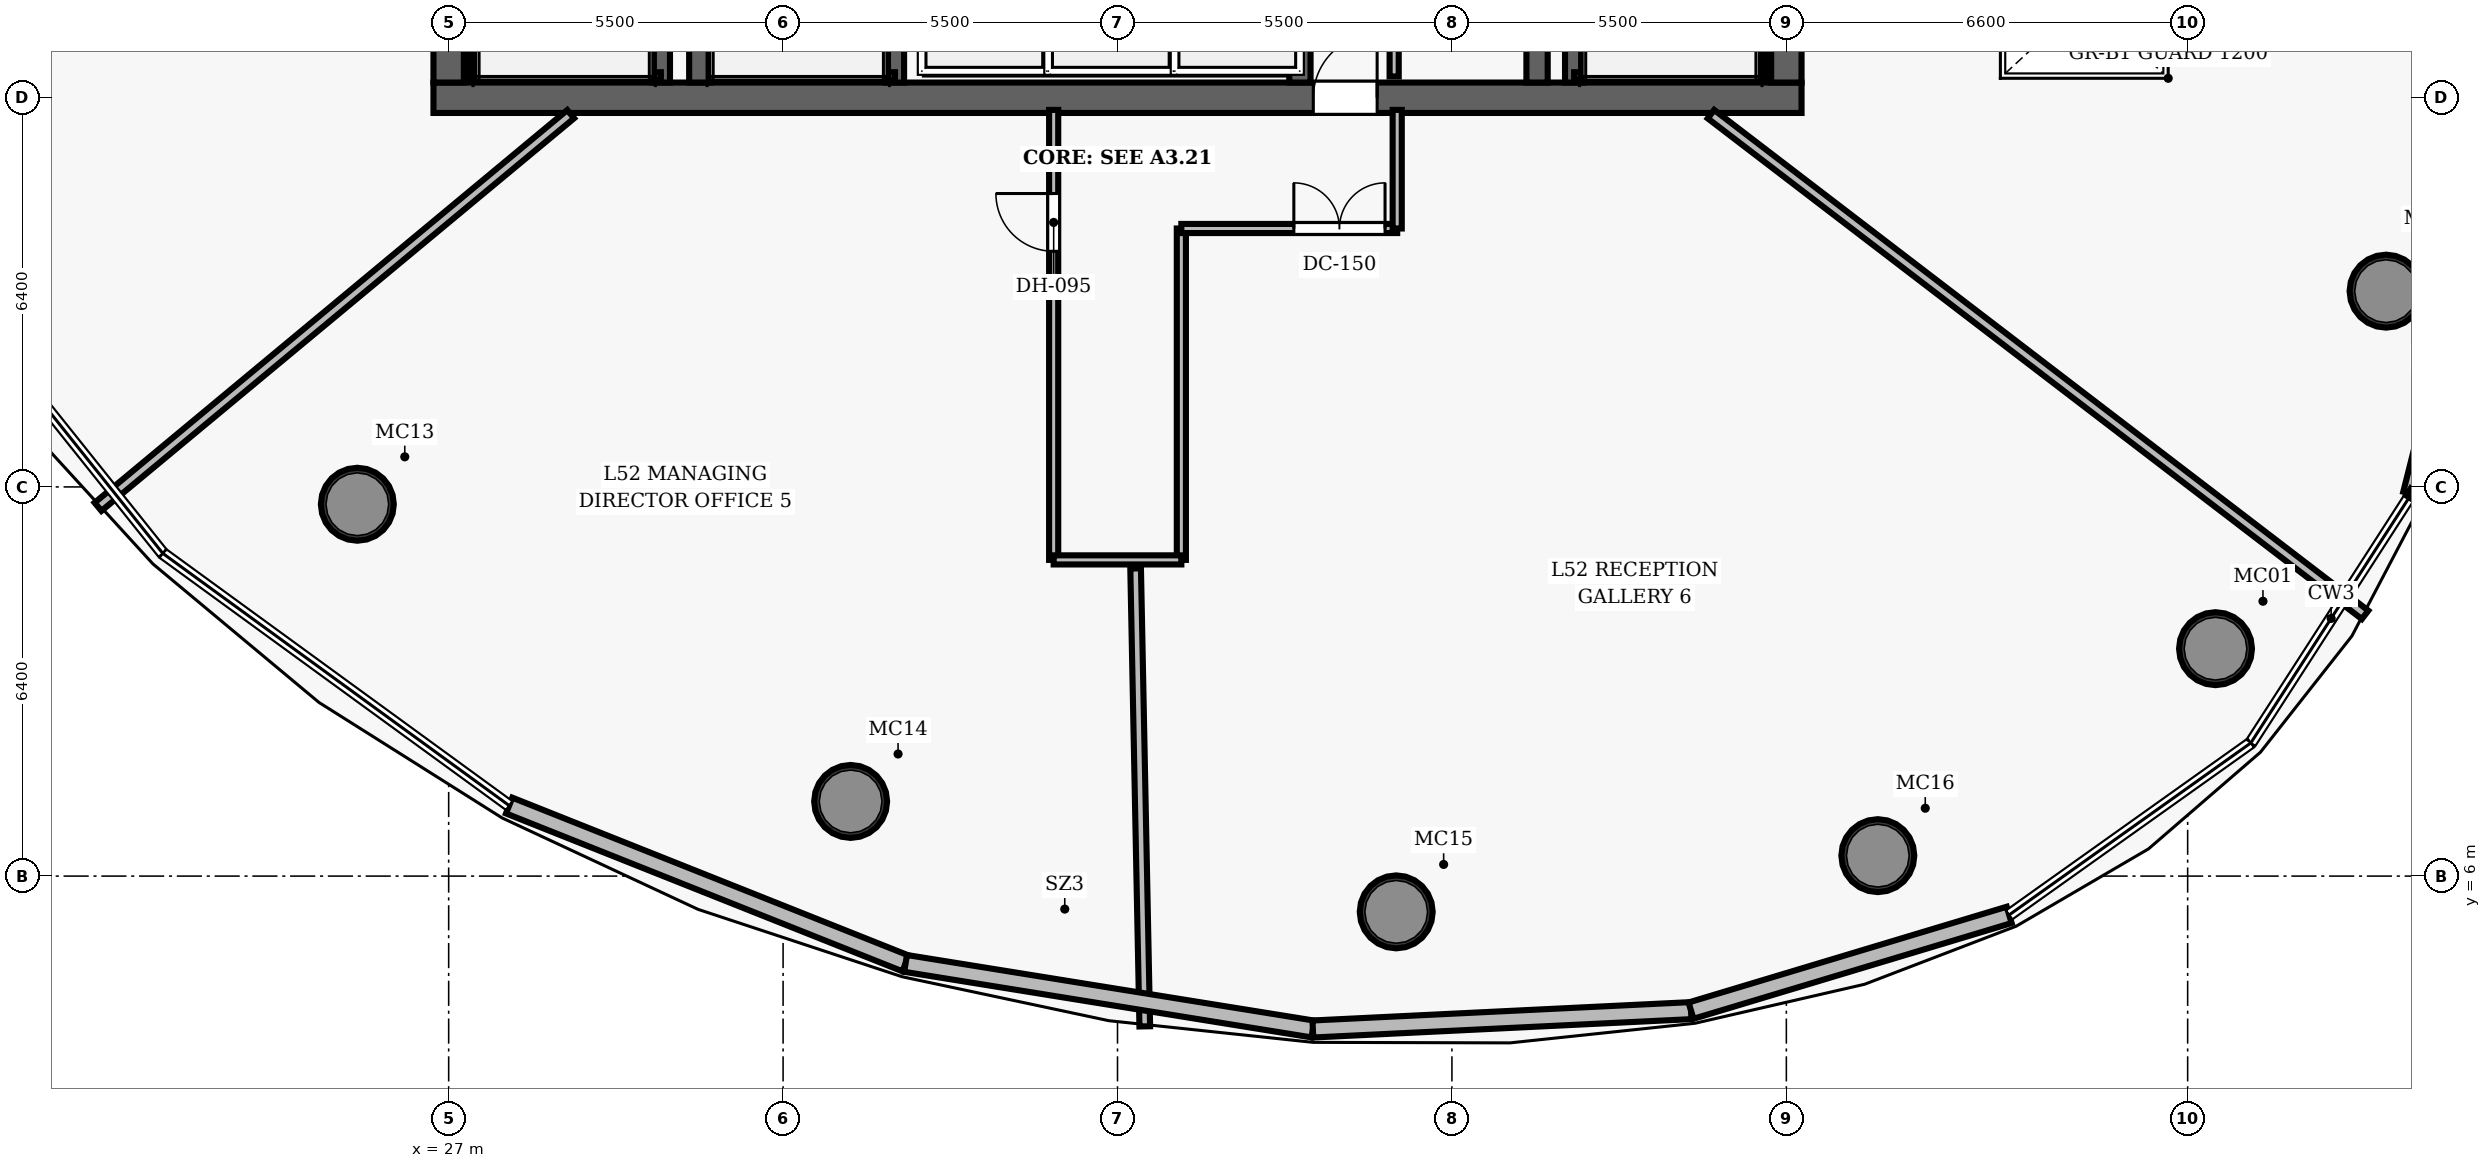
"""IFC4 building model, lengths in metres.
Left out: names, types, materials, properties, quantities, classifications, styles, units other than length and angle.
Written with IfcOpenShell. Run it as: python <this file> out.ifc"""

import sys

from ifc_helpers import new_model, si_unit, direction, frame, frame_2d, origin, origin_2d, place, context, subcontext, project, spatial, rectangle, hollow_circle, extrude, element, fill, save


model = new_model("IFC4")
c1 = context("Model", 3, precision=1e-05, world=origin(), true_north=direction((0.0, 1.0)))
c2 = subcontext(c1, "Body", "Model", "MODEL_VIEW")
j1 = project(units=[si_unit("LENGTHUNIT", "METRE"), si_unit("PLANEANGLEUNIT", "RADIAN")], contexts=[c1])
p1 = place(None, origin())
s1 = spatial("IfcSite", under=j1, at=p1, CompositionType="ELEMENT")
p2 = place(p1, origin())
s2 = spatial("IfcBuilding", under=s1, at=p2, CompositionType="ELEMENT")
p3 = place(p2, frame((0.0, 0.0, 205.85)))
s3 = spatial("IfcBuildingStorey", under=s2, at=p3, CompositionType="ELEMENT", Elevation=205.85)
p4 = place(p3, frame((26.75, 18.8, 0.0), z_axis=(0.0, 0.0, 1.0), x_axis=(1.0, 0.0, 0.0)))
e1 = element("IfcWall", 1, at=p4, inside=s3, PredefinedType="SHEAR", context=c2, shape_type="SweptSolid", body=[
    extrude(rectangle(XDim=22.5, YDim=0.5, at=frame_2d((11.25, 0.0))), origin(), (0.0, 0.0, 1.0), 3.85),
])
p5 = place(p4, frame((14.47, 0.0, 0.0)))
e2 = element("IfcOpeningElement", 2, at=p5, cuts=e1, PredefinedType="OPENING", context=c2, shape_type="SweptSolid", body=[
    extrude(rectangle(XDim=1.05, YDim=2.15, at=frame_2d((0.525, 1.075))), frame((0.0, 0.26, 0.0), z_axis=(0.0, -1.0, 0.0), x_axis=(1.0, 0.0, 0.0)), (0.0, 0.0, 1.0), 0.52),
])
p6 = place(p3, frame((27.0, 19.05, 0.0), z_axis=(0.0, 0.0, 1.0), x_axis=(0.0, 1.0, 0.0)))
e3 = element("IfcWall", 3, at=p6, inside=s3, PredefinedType="SHEAR", context=c2, shape_type="SweptSolid", body=[
    extrude(rectangle(XDim=13.9, YDim=0.5, at=frame_2d((6.95, 0.0))), origin(), (0.0, 0.0, 1.0), 3.85),
])
p7 = place(p6, frame((8.2, 0.0, 0.0)))
e4 = element("IfcOpeningElement", 4, at=p7, cuts=e3, PredefinedType="OPENING", context=c2, shape_type="SweptSolid", body=[
    extrude(rectangle(XDim=1.05, YDim=2.15, at=frame_2d((0.525, 1.075))), frame((0.0, 0.26, 0.0), z_axis=(0.0, -1.0, 0.0), x_axis=(1.0, 0.0, 0.0)), (0.0, 0.0, 1.0), 0.52),
])
p8 = place(p3, frame((49.0, 19.05, 0.0), z_axis=(0.0, 0.0, 1.0), x_axis=(0.0, 1.0, 0.0)))
e5 = element("IfcWall", 5, at=p8, inside=s3, PredefinedType="SHEAR", context=c2, shape_type="SweptSolid", body=[
    extrude(rectangle(XDim=13.9, YDim=0.5, at=frame_2d((6.95, 0.0))), origin(), (0.0, 0.0, 1.0), 3.85),
])
p9 = place(p8, frame((8.2, 0.0, 0.0)))
e6 = element("IfcOpeningElement", 6, at=p9, cuts=e5, PredefinedType="OPENING", context=c2, shape_type="SweptSolid", body=[
    extrude(rectangle(XDim=1.05, YDim=2.15, at=frame_2d((0.525, 1.075))), frame((0.0, 0.26, 0.0), z_axis=(0.0, -1.0, 0.0), x_axis=(1.0, 0.0, 0.0)), (0.0, 0.0, 1.0), 0.52),
])
for number, where, z_axis, x_axis in (
    (7, (31.13, 19.05, 0.0), (0.0, 0.0, 1.0), (0.0, 1.0, 0.0)),
    (8, (44.9, 19.05, 0.0), (0.0, 0.0, 1.0), (0.0, 1.0, 0.0)),
):
    element("IfcWall", number, at=place(p3, frame(where, z_axis=z_axis, x_axis=x_axis)), inside=s3, PredefinedType="SHEAR", context=c2, shape_type="SweptSolid", body=[
        extrude(rectangle(XDim=13.9, YDim=0.35, at=frame_2d((6.95, 0.0))), origin(), (0.0, 0.0, 1.0), 3.85),
    ])
for number, where, z_axis, x_axis in (
    (9, (56.058, 9.74, 0.0), (0.0, 0.0, 1.0), (1.0, 0.0, 0.0)),
    (10, (58.863, 15.619, 0.0), (0.0, 0.0, 1.0), (1.0, 0.0, 0.0)),
    (11, (25.498, 12.115, 0.0), (0.0, 0.0, 1.0), (1.0, 0.0, 0.0)),
    (12, (33.611, 7.228, 0.0), (0.0, 0.0, 1.0), (1.0, 0.0, 0.0)),
    (13, (42.584, 5.412, 0.0), (0.0, 0.0, 1.0), (1.0, 0.0, 0.0)),
    (14, (50.504, 6.336, 0.0), (0.0, 0.0, 1.0), (1.0, 0.0, 0.0)),
):
    element("IfcColumn", number, at=place(p3, frame(where, z_axis=z_axis, x_axis=x_axis)), inside=s3, PredefinedType="COLUMN", context=c2, shape_type="SweptSolid", body=[
        extrude(hollow_circle(Radius=0.6, WallThickness=0.05, at=origin_2d()), origin(), (0.0, 0.0, 1.0), 3.85),
    ])
p10 = place(p3, frame((30.49, 19.05, 0.0), z_axis=(0.0, 0.0, 1.0), x_axis=(0.0, 1.0, 0.0)))
e15 = element("IfcWall", 15, at=p10, inside=s3, PredefinedType="SHEAR", context=c2, shape_type="SweptSolid", body=[
    extrude(rectangle(XDim=7.5, YDim=0.3, at=frame_2d((3.75, 0.0))), origin(), (0.0, 0.0, 1.0), 3.85),
])
p11 = place(p3, frame((27.395, 19.1, 0.0), z_axis=(0.0, 0.0, 1.0), x_axis=(0.0, 1.0, 0.0)))
e16 = element("IfcWall", 16, at=p11, inside=s3, PredefinedType="SHEAR", context=c2, shape_type="SweptSolid", body=[
    extrude(rectangle(XDim=7.45, YDim=0.12, at=frame_2d((3.725, 0.0))), origin(), (0.0, 0.0, 1.0), 3.85),
])
p12 = place(p3, frame((27.395, 19.16, 0.0), z_axis=(0.0, 0.0, 1.0), x_axis=(1.0, 0.0, 0.0)))
e17 = element("IfcWall", 17, at=p12, inside=s3, PredefinedType="SHEAR", context=c2, shape_type="SweptSolid", body=[
    extrude(rectangle(XDim=3.095, YDim=0.12, at=frame_2d((1.547, 0.0))), origin(), (0.0, 0.0, 1.0), 3.85),
])
p13 = place(p3, frame((45.51, 19.05, 0.0), z_axis=(0.0, 0.0, 1.0), x_axis=(0.0, 1.0, 0.0)))
e18 = element("IfcWall", 18, at=p13, inside=s3, PredefinedType="SHEAR", context=c2, shape_type="SweptSolid", body=[
    extrude(rectangle(XDim=7.5, YDim=0.3, at=frame_2d((3.75, 0.0))), origin(), (0.0, 0.0, 1.0), 3.85),
])
p14 = place(p3, frame((48.605, 19.1, 0.0), z_axis=(0.0, 0.0, 1.0), x_axis=(0.0, 1.0, 0.0)))
e19 = element("IfcWall", 19, at=p14, inside=s3, PredefinedType="SHEAR", context=c2, shape_type="SweptSolid", body=[
    extrude(rectangle(XDim=7.45, YDim=0.12, at=frame_2d((3.725, 0.0))), origin(), (0.0, 0.0, 1.0), 3.85),
])
p15 = place(p3, frame((45.51, 19.16, 0.0), z_axis=(0.0, 0.0, 1.0), x_axis=(1.0, 0.0, 0.0)))
e20 = element("IfcWall", 20, at=p15, inside=s3, PredefinedType="SHEAR", context=c2, shape_type="SweptSolid", body=[
    extrude(rectangle(XDim=3.095, YDim=0.12, at=frame_2d((1.547, 0.0))), origin(), (0.0, 0.0, 1.0), 3.85),
])
p16 = place(p3, frame((34.34, 19.05, 0.0), z_axis=(0.0, 0.0, 1.0), x_axis=(0.0, 1.0, 0.0)))
e21 = element("IfcWall", 21, at=p16, inside=s3, PredefinedType="SHEAR", context=c2, shape_type="SweptSolid", body=[
    extrude(rectangle(XDim=7.5, YDim=0.3, at=frame_2d((3.75, 0.0))), origin(), (0.0, 0.0, 1.0), 3.85),
])
p17 = place(p3, frame((31.3, 19.16, 0.0), z_axis=(0.0, 0.0, 1.0), x_axis=(1.0, 0.0, 0.0)))
e22 = element("IfcWall", 22, at=p17, inside=s3, PredefinedType="SHEAR", context=c2, shape_type="SweptSolid", body=[
    extrude(rectangle(XDim=3.04, YDim=0.12, at=frame_2d((1.52, 0.0))), origin(), (0.0, 0.0, 1.0), 3.85),
])
p18 = place(p3, frame((41.0, 19.05, 0.0), z_axis=(0.0, 0.0, 1.0), x_axis=(0.0, 1.0, 0.0)))
e23 = element("IfcWall", 23, at=p18, inside=s3, PredefinedType="SHEAR", context=c2, shape_type="SweptSolid", body=[
    extrude(rectangle(XDim=2.08, YDim=0.35, at=frame_2d((1.04, 0.0))), origin(), (0.0, 0.0, 1.0), 3.035),
])
p19 = place(p3, frame((42.55, 19.15, 0.0), z_axis=(0.0, 0.0, 1.0), x_axis=(0.0, 1.0, 0.0)))
e24 = element("IfcWall", 24, at=p19, inside=s3, PredefinedType="PARTITIONING", context=c2, shape_type="SweptSolid", body=[
    extrude(rectangle(XDim=2.75, YDim=0.15, at=frame_2d((1.375, 0.0))), origin(), (0.0, 0.0, 1.0), 3.035),
])
p20 = place(p19, frame((0.7, 0.0, 0.0)))
e25 = element("IfcOpeningElement", 25, at=p20, cuts=e24, PredefinedType="OPENING", context=c2, shape_type="SweptSolid", body=[
    extrude(rectangle(XDim=0.85, YDim=2.1, at=frame_2d((0.425, 1.05))), frame((0.0, 0.085, 0.0), z_axis=(0.0, -1.0, 0.0), x_axis=(1.0, 0.0, 0.0)), (0.0, 0.0, 1.0), 0.17),
])
p21 = place(p3, frame((36.95, 11.2, 0.0), z_axis=(0.0, 0.0, 1.0), x_axis=(0.0, 1.0, 0.0)))
e26 = element("IfcWall", 26, at=p21, inside=s3, PredefinedType="PARTITIONING", context=c2, shape_type="SweptSolid", body=[
    extrude(rectangle(XDim=7.4, YDim=0.15, at=frame_2d((3.7, 0.0))), origin(), (0.0, 0.0, 1.0), 3.035),
])
p22 = place(p21, frame((5.075, 0.0, 0.0)))
e27 = element("IfcOpeningElement", 27, at=p22, cuts=e26, PredefinedType="OPENING", context=c2, shape_type="SweptSolid", body=[
    extrude(rectangle(XDim=0.95, YDim=2.15, at=frame_2d((0.475, 1.075))), frame((0.0, 0.085, 0.0), z_axis=(0.0, -1.0, 0.0), x_axis=(1.0, 0.0, 0.0)), (0.0, 0.0, 1.0), 0.17),
])
p23 = place(p3, frame((39.05, 11.2, 0.0), z_axis=(0.0, 0.0, 1.0), x_axis=(0.0, 1.0, 0.0)))
e28 = element("IfcWall", 28, at=p23, inside=s3, PredefinedType="PARTITIONING", context=c2, shape_type="SweptSolid", body=[
    extrude(rectangle(XDim=5.45, YDim=0.15, at=frame_2d((2.725, 0.0))), origin(), (0.0, 0.0, 1.0), 3.035),
])
p24 = place(p3, frame((39.05, 16.65, 0.0), z_axis=(0.0, 0.0, 1.0), x_axis=(1.0, 0.0, 0.0)))
e29 = element("IfcWall", 29, at=p24, inside=s3, PredefinedType="PARTITIONING", context=c2, shape_type="SweptSolid", body=[
    extrude(rectangle(XDim=3.55, YDim=0.15, at=frame_2d((1.775, 0.0))), origin(), (0.0, 0.0, 1.0), 3.035),
])
p25 = place(p24, frame((1.85, 0.0, 0.0)))
e30 = element("IfcOpeningElement", 30, at=p25, cuts=e29, PredefinedType="OPENING", context=c2, shape_type="SweptSolid", body=[
    extrude(rectangle(XDim=1.5, YDim=2.2, at=frame_2d((0.75, 1.1))), frame((0.0, 0.085, 0.0), z_axis=(0.0, -1.0, 0.0), x_axis=(1.0, 0.0, 0.0)), (0.0, 0.0, 1.0), 0.17),
])
p26 = place(p3, frame((42.6, 16.65, 0.0), z_axis=(0.0, 0.0, 1.0), x_axis=(0.0, 1.0, 0.0)))
e31 = element("IfcWall", 31, at=p26, inside=s3, PredefinedType="PARTITIONING", context=c2, shape_type="SweptSolid", body=[
    extrude(rectangle(XDim=1.95, YDim=0.15, at=frame_2d((0.975, 0.0))), origin(), (0.0, 0.0, 1.0), 3.035),
])
p27 = place(p3, frame((36.95, 11.2, 0.0), z_axis=(0.0, 0.0, 1.0), x_axis=(1.0, 0.0, 0.0)))
e32 = element("IfcWall", 32, at=p27, inside=s3, PredefinedType="PARTITIONING", context=c2, shape_type="SweptSolid", body=[
    extrude(rectangle(XDim=2.1, YDim=0.15, at=frame_2d((1.05, 0.0))), origin(), (0.0, 0.0, 1.0), 3.035),
])
p28 = place(p3, frame((29.007, 18.53, 0.0), z_axis=(0.0, 0.0, 1.0), x_axis=(-0.769234217395, -0.638966915253, 0.0)))
e33 = element("IfcWall", 33, at=p28, inside=s3, PredefinedType="PARTITIONING", context=c2, shape_type="SweptSolid", body=[
    extrude(rectangle(XDim=10.105, YDim=0.175, at=frame_2d((5.053, 0.0))), origin(), (0.0, 0.0, 1.0), 3.035),
])
p29 = place(p3, frame((38.298, 11.06, 0.0), z_axis=(0.0, 0.0, 1.0), x_axis=(0.019932501838, -0.99980132795, 0.0)))
e34 = element("IfcWall", 34, at=p29, inside=s3, PredefinedType="PARTITIONING", context=c2, shape_type="SweptSolid", body=[
    extrude(rectangle(XDim=7.533, YDim=0.175, at=frame_2d((3.766, 0.0))), origin(), (0.0, 0.0, 1.0), 3.035),
])
p30 = place(p3, frame((47.76, 18.53, 0.0), z_axis=(0.0, 0.0, 1.0), x_axis=(0.794107620506, -0.607777168916, 0.0)))
e35 = element("IfcWall", 35, at=p30, inside=s3, PredefinedType="PARTITIONING", context=c2, shape_type="SweptSolid", body=[
    extrude(rectangle(XDim=13.547, YDim=0.175, at=frame_2d((6.773, 0.0))), origin(), (0.0, 0.0, 1.0), 3.035),
])
p31 = place(p3, frame((60.617, 17.585, 0.0), z_axis=(0.0, 0.0, 1.0), x_axis=(-0.244385353769, -0.969678193456, 0.0)))
e36 = element("IfcWall", 36, at=p31, inside=s3, PredefinedType="SOLIDWALL", context=c2, shape_type="SweptSolid", body=[
    extrude(rectangle(XDim=5.465, YDim=0.28, at=frame_2d((2.732, 0.0))), origin(), (0.0, 0.0, 1.0), 3.62),
])
p32 = place(p3, frame((34.515, 4.564, 0.0), z_axis=(0.0, 0.0, 1.0), x_axis=(-0.929075312882, 0.369890609495, 0.0)))
e37 = element("IfcWall", 37, at=p32, inside=s3, PredefinedType="SOLIDWALL", context=c2, shape_type="SweptSolid", body=[
    extrude(rectangle(XDim=7.018, YDim=0.28, at=frame_2d((3.509, 0.0))), origin(), (0.0, 0.0, 1.0), 3.62),
])
p33 = place(p3, frame((41.213, 3.486, 0.0), z_axis=(0.0, 0.0, 1.0), x_axis=(-0.987281599143, 0.158981269318, 0.0)))
e38 = element("IfcWall", 38, at=p33, inside=s3, PredefinedType="SOLIDWALL", context=c2, shape_type="SweptSolid", body=[
    extrude(rectangle(XDim=6.784, YDim=0.28, at=frame_2d((3.392, 0.0))), origin(), (0.0, 0.0, 1.0), 3.62),
])
p34 = place(p3, frame((47.432, 3.788, 0.0), z_axis=(0.0, 0.0, 1.0), x_axis=(-0.998822985186, -0.048504064408, 0.0)))
e39 = element("IfcWall", 39, at=p34, inside=s3, PredefinedType="SOLIDWALL", context=c2, shape_type="SweptSolid", body=[
    extrude(rectangle(XDim=6.226, YDim=0.28, at=frame_2d((3.113, 0.0))), origin(), (0.0, 0.0, 1.0), 3.62),
])
p35 = place(p3, frame((52.665, 5.362, 0.0), z_axis=(0.0, 0.0, 1.0), x_axis=(-0.957591096502, -0.288130685454, 0.0)))
e40 = element("IfcWall", 40, at=p35, inside=s3, PredefinedType="SOLIDWALL", context=c2, shape_type="SweptSolid", body=[
    extrude(rectangle(XDim=5.464, YDim=0.28, at=frame_2d((2.732, 0.0))), origin(), (0.0, 0.0, 1.0), 3.62),
])
p36 = place(p5, origin())
e41 = element("IfcDoor", 41, at=p36, inside=s3, OperationType="SINGLE_SWING_RIGHT", PredefinedType="DOOR", context=c2, shape_type="SweptSolid", body=[
    extrude(rectangle(XDim=1.05, YDim=2.15, at=frame_2d((0.525, 1.075))), frame((0.0, 0.025, 0.0), z_axis=(0.0, -1.0, 0.0), x_axis=(1.0, 0.0, 0.0)), (0.0, 0.0, 1.0), 0.05),
])
fill(e2, e41)
p37 = place(p22, origin())
e42 = element("IfcDoor", 42, at=p37, inside=s3, OperationType="SINGLE_SWING_RIGHT", PredefinedType="DOOR", context=c2, shape_type="SweptSolid", body=[
    extrude(rectangle(XDim=0.95, YDim=2.15, at=frame_2d((0.475, 1.075))), frame((0.0, 0.025, 0.0), z_axis=(0.0, -1.0, 0.0), x_axis=(1.0, 0.0, 0.0)), (0.0, 0.0, 1.0), 0.05),
])
fill(e27, e42)
p38 = place(p25, origin())
e43 = element("IfcDoor", 43, at=p38, inside=s3, OperationType="DOUBLE_DOOR_SINGLE_SWING", PredefinedType="DOOR", context=c2, shape_type="SweptSolid", body=[
    extrude(rectangle(XDim=1.5, YDim=2.2, at=frame_2d((0.75, 1.1))), frame((0.0, 0.025, 0.0), z_axis=(0.0, -1.0, 0.0), x_axis=(1.0, 0.0, 0.0)), (0.0, 0.0, 1.0), 0.05),
])
fill(e30, e43)
save(model, sys.argv[1])
